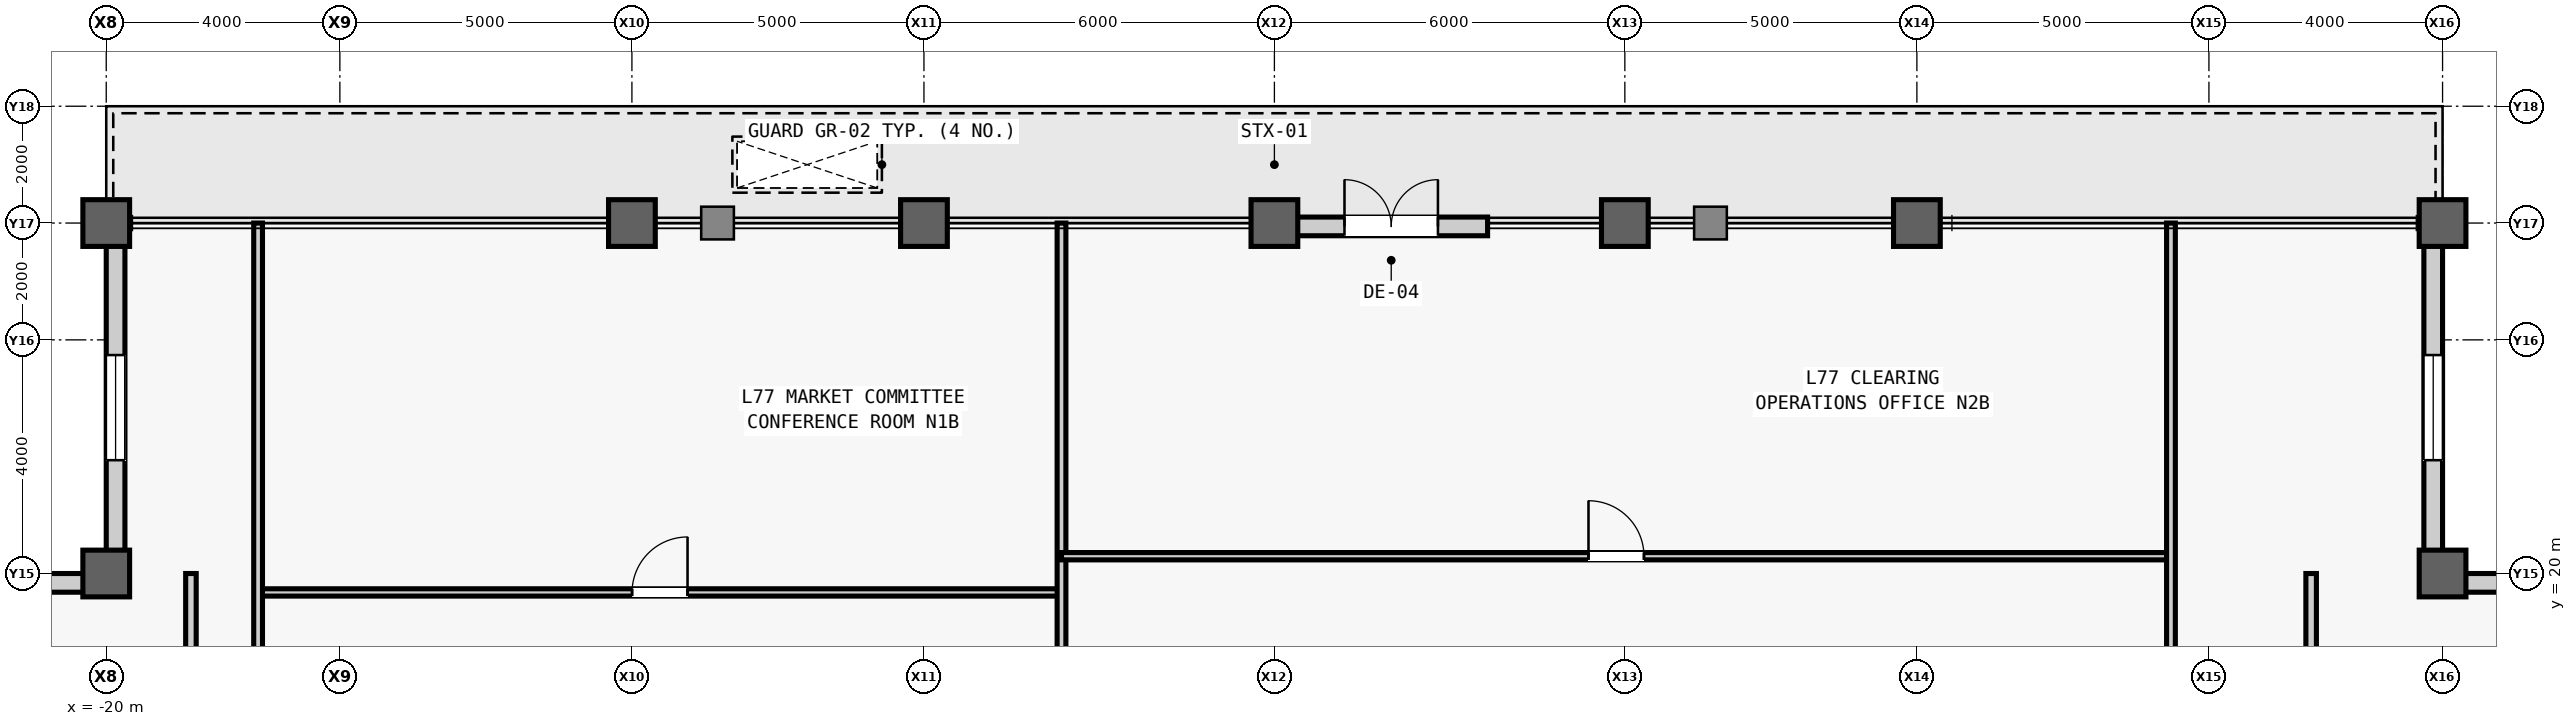
"""IFC4 building model, lengths in metres.
Left out: names, types, materials, properties, quantities, classifications, styles, units other than length and angle.
Written with IfcOpenShell. Run it as: python <this file> out.ifc"""

import sys

from ifc_helpers import new_model, si_unit, direction, frame, frame_2d, origin, origin_2d, place, context, subcontext, project, spatial, rectangle, hollow_rectangle, extrude, source, transform, mapped, element, fill, save


model = new_model("IFC4")
c1 = context("Model", 3, precision=1e-05, world=origin(), true_north=direction((0.0, 1.0)))
c2 = subcontext(c1, "Body", "Model", "MODEL_VIEW")
j1 = project(units=[si_unit("LENGTHUNIT", "METRE"), si_unit("PLANEANGLEUNIT", "RADIAN")], contexts=[c1])
p1 = place(None, origin())
s1 = spatial("IfcSite", under=j1, at=p1, CompositionType="ELEMENT")
p2 = place(p1, origin())
s2 = spatial("IfcBuilding", under=s1, at=p2, CompositionType="ELEMENT")
p3 = place(p2, frame((0.0, 0.0, 326.3)))
s3 = spatial("IfcBuildingStorey", under=s2, at=p3, CompositionType="ELEMENT", Elevation=326.3)
m1 = source(origin(), c2, "Body", "SweptSolid", [
    extrude(hollow_rectangle(XDim=0.8, YDim=0.8, WallThickness=0.045, at=origin_2d()), origin(), (0.0, 0.0, 1.0), 4.0),
])
for number, where, z_axis, x_axis in (
    (1, (-20.0, 20.0, 0.0), (0.0, 0.0, 1.0), (1.0, 0.0, 0.0)),
    (2, (-20.0, 26.0, 0.0), (0.0, 0.0, 1.0), (1.0, 0.0, 0.0)),
    (3, (-11.0, 26.0, 0.0), (0.0, 0.0, 1.0), (1.0, 0.0, 0.0)),
    (4, (-6.0, 26.0, 0.0), (0.0, 0.0, 1.0), (1.0, 0.0, 0.0)),
    (5, (0.0, 26.0, 0.0), (0.0, 0.0, 1.0), (1.0, 0.0, 0.0)),
    (6, (6.0, 26.0, 0.0), (0.0, 0.0, 1.0), (1.0, 0.0, 0.0)),
    (7, (11.0, 26.0, 0.0), (0.0, 0.0, 1.0), (1.0, 0.0, 0.0)),
    (8, (20.0, 20.0, 0.0), (0.0, 0.0, 1.0), (1.0, 0.0, 0.0)),
    (9, (20.0, 26.0, 0.0), (0.0, 0.0, 1.0), (1.0, 0.0, 0.0)),
):
    element("IfcColumn", number, at=place(p3, frame(where, z_axis=z_axis, x_axis=x_axis)), inside=s3, PredefinedType="COLUMN", context=c2, shape_type="MappedRepresentation", body=[
        mapped(m1, transform((0.0, 0.0, 0.0), scale=1.0)),
    ])
m2 = source(origin(), c2, "Body", "SweptSolid", [
    extrude(rectangle(XDim=5.68, YDim=0.32, at=frame_2d((2.84, 0.0))), origin(), (0.0, 0.0, 1.0), 3.191),
])
p4 = place(p3, frame((20.0, 19.84, 0.0), z_axis=(0.0, 0.0, 1.0), x_axis=(1.0, 0.0, 0.0)))
e10 = element("IfcWall", 10, at=p4, inside=s3, PredefinedType="STANDARD", context=c2, shape_type="MappedRepresentation", body=[
    mapped(m2, transform((0.0, 0.0, 0.0), scale=1.0)),
])
m3 = source(origin(), c2, "Body", "SweptSolid", [
    extrude(rectangle(XDim=1.8, YDim=2.4, at=frame_2d((0.9, 1.2))), frame((0.0, 0.17, 0.0), z_axis=(0.0, -1.0, 0.0), x_axis=(1.0, 0.0, 0.0)), (0.0, 0.0, 1.0), 0.34),
])
p5 = place(p4, frame((1.94, 0.0, 0.5)))
e11 = element("IfcOpeningElement", 11, at=p5, cuts=e10, PredefinedType="OPENING", context=c2, shape_type="MappedRepresentation", body=[
    mapped(m3, transform((0.0, 0.0, 0.0), scale=1.0)),
])
p6 = place(p3, frame((19.84, 20.0, 0.0), z_axis=(0.0, 0.0, 1.0), x_axis=(0.0, 1.0, 0.0)))
e12 = element("IfcWall", 12, at=p6, inside=s3, PredefinedType="STANDARD", context=c2, shape_type="MappedRepresentation", body=[
    mapped(m2, transform((0.0, 0.0, 0.0), scale=1.0)),
])
p7 = place(p6, frame((1.94, 0.0, 0.5)))
e13 = element("IfcOpeningElement", 13, at=p7, cuts=e12, PredefinedType="OPENING", context=c2, shape_type="MappedRepresentation", body=[
    mapped(m3, transform((0.0, 0.0, 0.0), scale=1.0)),
])
p8 = place(p3, frame((-19.84, 20.0, 0.0), z_axis=(0.0, 0.0, 1.0), x_axis=(0.0, 1.0, 0.0)))
e14 = element("IfcWall", 14, at=p8, inside=s3, PredefinedType="STANDARD", context=c2, shape_type="MappedRepresentation", body=[
    mapped(m2, transform((0.0, 0.0, 0.0), scale=1.0)),
])
p9 = place(p8, frame((1.94, 0.0, 0.5)))
e15 = element("IfcOpeningElement", 15, at=p9, cuts=e14, PredefinedType="OPENING", context=c2, shape_type="MappedRepresentation", body=[
    mapped(m3, transform((0.0, 0.0, 0.0), scale=1.0)),
])
p10 = place(p3, frame((-20.0, 19.84, 0.0), z_axis=(0.0, 0.0, 1.0), x_axis=(-1.0, 0.0, 0.0)))
e16 = element("IfcWall", 16, at=p10, inside=s3, PredefinedType="STANDARD", context=c2, shape_type="MappedRepresentation", body=[
    mapped(m2, transform((0.0, 0.0, 0.0), scale=1.0)),
])
p11 = place(p10, frame((1.94, 0.0, 0.5)))
e17 = element("IfcOpeningElement", 17, at=p11, cuts=e16, PredefinedType="OPENING", context=c2, shape_type="MappedRepresentation", body=[
    mapped(m3, transform((0.0, 0.0, 0.0), scale=1.0)),
])
m4 = source(origin(), c2, "Body", "SweptSolid", [
    extrude(rectangle(XDim=3.3, YDim=0.32, at=frame_2d((1.65, 0.0))), origin(), (0.0, 0.0, 1.0), 3.191),
])
p12 = place(p3, frame((0.35, 25.942, 0.0), z_axis=(0.0, 0.0, 1.0), x_axis=(1.0, 0.0, 0.0)))
e18 = element("IfcWall", 18, at=p12, inside=s3, PredefinedType="STANDARD", context=c2, shape_type="MappedRepresentation", body=[
    mapped(m4, transform((0.0, 0.0, 0.0), scale=1.0)),
])
m5 = source(origin(), c2, "Body", "SweptSolid", [
    extrude(rectangle(XDim=1.6, YDim=2.25, at=frame_2d((0.8, 1.125))), frame((0.0, 0.17, 0.0), z_axis=(0.0, -1.0, 0.0), x_axis=(1.0, 0.0, 0.0)), (0.0, 0.0, 1.0), 0.34),
])
p13 = place(p12, frame((0.85, 0.0, 0.0)))
e19 = element("IfcOpeningElement", 19, at=p13, cuts=e18, PredefinedType="OPENING", context=c2, shape_type="MappedRepresentation", body=[
    mapped(m5, transform((0.0, 0.0, 0.0), scale=1.0)),
])
m6 = source(origin(), c2, "Body", "SweptSolid", [
    extrude(rectangle(XDim=13.755, YDim=0.125, at=frame_2d((6.877, 0.0))), origin(), (0.0, 0.0, 1.0), 3.393),
])
p14 = place(p3, frame((-17.4, 19.676, 0.0), z_axis=(0.0, 0.0, 1.0), x_axis=(1.0, 0.0, 0.0)))
e20 = element("IfcWall", 20, at=p14, inside=s3, PredefinedType="PARTITIONING", context=c2, shape_type="MappedRepresentation", body=[
    mapped(m6, transform((0.0, 0.0, 0.0), scale=1.0)),
])
m7 = source(origin(), c2, "Body", "SweptSolid", [
    extrude(rectangle(XDim=0.95, YDim=2.15, at=frame_2d((0.475, 1.075))), frame((0.0, 0.073, 0.0), z_axis=(0.0, -1.0, 0.0), x_axis=(1.0, 0.0, 0.0)), (0.0, 0.0, 1.0), 0.145),
])
p15 = place(p14, frame((6.403, 0.0, 0.0)))
e21 = element("IfcOpeningElement", 21, at=p15, cuts=e20, PredefinedType="OPENING", context=c2, shape_type="MappedRepresentation", body=[
    mapped(m7, transform((0.0, 0.0, 0.0), scale=1.0)),
])
m8 = source(origin(), c2, "Body", "SweptSolid", [
    extrude(rectangle(XDim=12.4, YDim=0.15, at=frame_2d((6.2, 0.0))), origin(), (0.0, 0.0, 1.0), 3.74),
])
p16 = place(p3, frame((-3.645, 13.6, 0.0), z_axis=(0.0, 0.0, 1.0), x_axis=(0.0, 1.0, 0.0)))
e22 = element("IfcWall", 22, at=p16, inside=s3, PredefinedType="PARTITIONING", context=c2, shape_type="MappedRepresentation", body=[
    mapped(m8, transform((0.0, 0.0, 0.0), scale=1.0)),
])
m9 = source(origin(), c2, "Body", "SweptSolid", [
    extrude(rectangle(XDim=0.95, YDim=2.15, at=frame_2d((0.475, 1.075))), frame((0.0, 0.085, 0.0), z_axis=(0.0, -1.0, 0.0), x_axis=(1.0, 0.0, 0.0)), (0.0, 0.0, 1.0), 0.17),
])
p17 = place(p16, frame((2.501, 0.0, 0.0)))
e23 = element("IfcOpeningElement", 23, at=p17, cuts=e22, PredefinedType="OPENING", context=c2, shape_type="MappedRepresentation", body=[
    mapped(m9, transform((0.0, 0.0, 0.0), scale=1.0)),
])
m10 = source(origin(), c2, "Body", "SweptSolid", [
    extrude(rectangle(XDim=18.995, YDim=0.125, at=frame_2d((9.498, 0.0))), origin(), (0.0, 0.0, 1.0), 3.74),
])
p18 = place(p3, frame((-3.645, 20.296, 0.0), z_axis=(0.0, 0.0, 1.0), x_axis=(1.0, 0.0, 0.0)))
e24 = element("IfcWall", 24, at=p18, inside=s3, PredefinedType="PARTITIONING", context=c2, shape_type="MappedRepresentation", body=[
    mapped(m10, transform((0.0, 0.0, 0.0), scale=1.0)),
])
p19 = place(p18, frame((9.022, 0.0, 0.0)))
e25 = element("IfcOpeningElement", 25, at=p19, cuts=e24, PredefinedType="OPENING", context=c2, shape_type="MappedRepresentation", body=[
    mapped(m7, transform((0.0, 0.0, 0.0), scale=1.0)),
])
m11 = source(origin(), c2, "Body", "SweptSolid", [
    extrude(rectangle(XDim=10.4, YDim=0.15, at=frame_2d((5.2, 0.0))), origin(), (0.0, 0.0, 1.0), 3.74),
])
p20 = place(p3, frame((-17.4, 15.6, 0.0), z_axis=(0.0, 0.0, 1.0), x_axis=(0.0, 1.0, 0.0)))
e26 = element("IfcWall", 26, at=p20, inside=s3, PredefinedType="PARTITIONING", context=c2, shape_type="MappedRepresentation", body=[
    mapped(m11, transform((0.0, 0.0, 0.0), scale=1.0)),
])
p21 = place(p3, frame((15.35, 13.6, 0.0), z_axis=(0.0, 0.0, 1.0), x_axis=(0.0, 1.0, 0.0)))
e27 = element("IfcWall", 27, at=p21, inside=s3, PredefinedType="PARTITIONING", context=c2, shape_type="MappedRepresentation", body=[
    mapped(m8, transform((0.0, 0.0, 0.0), scale=1.0)),
])
m12 = source(origin(), c2, "Body", "SweptSolid", [
    extrude(rectangle(XDim=39.4, YDim=0.18, at=frame_2d((19.7, 0.0))), origin(), (0.0, 0.0, 1.0), 3.74),
])
p22 = place(p3, frame((-18.55, -19.4, 0.0), z_axis=(0.0, 0.0, 1.0), x_axis=(0.0, 1.0, 0.0)))
e28 = element("IfcWall", 28, at=p22, inside=s3, PredefinedType="PARTITIONING", context=c2, shape_type="MappedRepresentation", body=[
    mapped(m12, transform((0.0, 0.0, 0.0), scale=1.0)),
])
m13 = source(origin(), c2, "Body", "SweptSolid", [
    extrude(rectangle(XDim=0.95, YDim=2.15, at=frame_2d((0.475, 1.075))), frame((0.0, 0.1, 0.0), z_axis=(0.0, -1.0, 0.0), x_axis=(1.0, 0.0, 0.0)), (0.0, 0.0, 1.0), 0.2),
])
p23 = place(p22, frame((7.441, 0.0, 0.0)))
e29 = element("IfcOpeningElement", 29, at=p23, cuts=e28, PredefinedType="OPENING", context=c2, shape_type="MappedRepresentation", body=[
    mapped(m13, transform((0.0, 0.0, 0.0), scale=1.0)),
])
p24 = place(p22, frame((17.899, 0.0, 0.0)))
e30 = element("IfcOpeningElement", 30, at=p24, cuts=e28, PredefinedType="OPENING", context=c2, shape_type="MappedRepresentation", body=[
    mapped(m13, transform((0.0, 0.0, 0.0), scale=1.0)),
])
p25 = place(p22, frame((28.683, 0.0, 0.0)))
e31 = element("IfcOpeningElement", 31, at=p25, cuts=e28, PredefinedType="OPENING", context=c2, shape_type="MappedRepresentation", body=[
    mapped(m13, transform((0.0, 0.0, 0.0), scale=1.0)),
])
p26 = place(p3, frame((17.75, -19.4, 0.0), z_axis=(0.0, 0.0, 1.0), x_axis=(0.0, 1.0, 0.0)))
e32 = element("IfcWall", 32, at=p26, inside=s3, PredefinedType="PARTITIONING", context=c2, shape_type="MappedRepresentation", body=[
    mapped(m12, transform((0.0, 0.0, 0.0), scale=1.0)),
])
p27 = place(p26, frame((17.225, 0.0, 0.0)))
e33 = element("IfcOpeningElement", 33, at=p27, cuts=e32, PredefinedType="OPENING", context=c2, shape_type="MappedRepresentation", body=[
    mapped(m13, transform((0.0, 0.0, 0.0), scale=1.0)),
])
m14 = source(origin(), c2, "Body", "SweptSolid", [
    extrude(rectangle(XDim=1.8, YDim=2.4, at=frame_2d((0.9, 1.2))), frame((0.0, 0.03, 0.0), z_axis=(0.0, -1.0, 0.0), x_axis=(1.0, 0.0, 0.0)), (0.0, 0.0, 1.0), 0.06),
])
p28 = place(p7, origin())
e34 = element("IfcWindow", 34, at=p28, inside=s3, PartitioningType="SINGLE_PANEL", PredefinedType="WINDOW", context=c2, shape_type="MappedRepresentation", body=[
    mapped(m14, transform((0.0, 0.0, 0.0), scale=1.0)),
])
fill(e13, e34)
p29 = place(p9, origin())
e35 = element("IfcWindow", 35, at=p29, inside=s3, PartitioningType="SINGLE_PANEL", PredefinedType="WINDOW", context=c2, shape_type="MappedRepresentation", body=[
    mapped(m14, transform((0.0, 0.0, 0.0), scale=1.0)),
])
fill(e15, e35)
m15 = source(origin(), c2, "Body", "SweptSolid", [
    extrude(rectangle(XDim=1.6, YDim=2.25, at=frame_2d((0.8, 1.125))), frame((0.0, 0.025, 0.0), z_axis=(0.0, -1.0, 0.0), x_axis=(1.0, 0.0, 0.0)), (0.0, 0.0, 1.0), 0.05),
])
p30 = place(p13, origin())
e36 = element("IfcDoor", 36, at=p30, inside=s3, OperationType="DOUBLE_DOOR_SINGLE_SWING", PredefinedType="DOOR", context=c2, shape_type="MappedRepresentation", body=[
    mapped(m15, transform((0.0, 0.0, 0.0), scale=1.0)),
])
fill(e19, e36)
m16 = source(origin(), c2, "Body", "SweptSolid", [
    extrude(rectangle(XDim=0.95, YDim=2.15, at=frame_2d((0.475, 1.075))), frame((0.0, 0.025, 0.0), z_axis=(0.0, -1.0, 0.0), x_axis=(1.0, 0.0, 0.0)), (0.0, 0.0, 1.0), 0.05),
])
p31 = place(p15, origin())
e37 = element("IfcDoor", 37, at=p31, inside=s3, OperationType="SINGLE_SWING_RIGHT", PredefinedType="DOOR", context=c2, shape_type="MappedRepresentation", body=[
    mapped(m16, transform((0.0, 0.0, 0.0), scale=1.0)),
])
fill(e21, e37)
p32 = place(p19, origin())
e38 = element("IfcDoor", 38, at=p32, inside=s3, OperationType="SINGLE_SWING_LEFT", PredefinedType="DOOR", context=c2, shape_type="MappedRepresentation", body=[
    mapped(m16, transform((0.0, 0.0, 0.0), scale=1.0)),
])
fill(e25, e38)
save(model, sys.argv[1])
